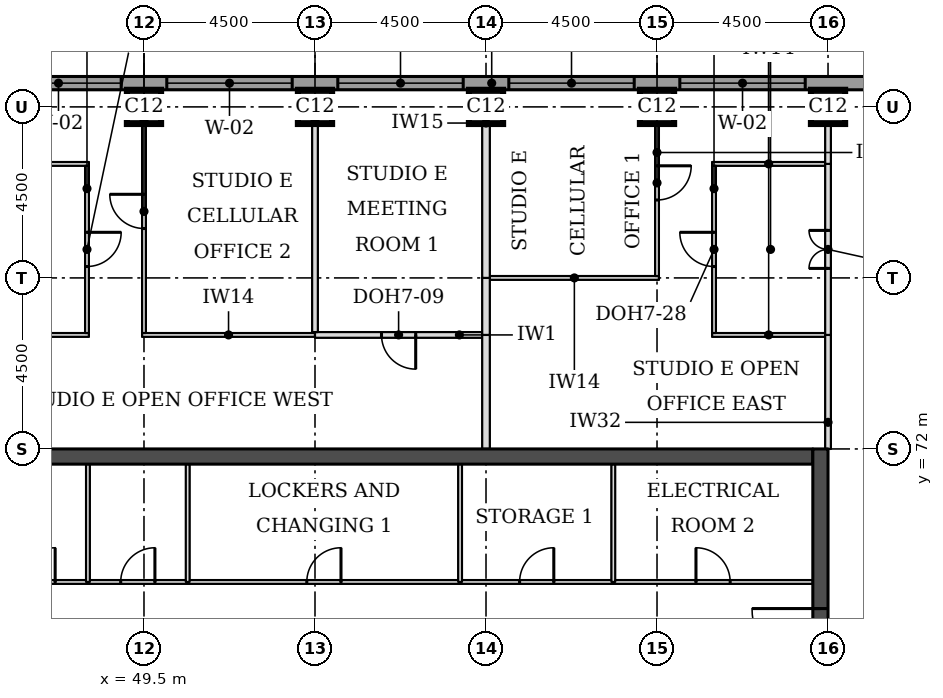
"""IFC4 building model, lengths in metres.
Left out: names, types, materials, properties, quantities, classifications, styles, units other than length and angle.
Written with IfcOpenShell. Run it as: python <this file> out.ifc"""

import sys

from ifc_helpers import new_model, si_unit, direction, frame, frame_2d, origin, origin_2d, place, context, subcontext, project, spatial, rectangle, extrude, element, fill, save


model = new_model("IFC4")
c1 = context("Model", 3, precision=1e-05, world=origin(), true_north=direction((0.0, 1.0)))
c2 = subcontext(c1, "Body", "Model", "MODEL_VIEW")
j1 = project(units=[si_unit("LENGTHUNIT", "METRE"), si_unit("PLANEANGLEUNIT", "RADIAN")], contexts=[c1])
p1 = place(None, origin())
s1 = spatial("IfcSite", under=j1, at=p1, CompositionType="ELEMENT")
p2 = place(p1, origin())
s2 = spatial("IfcBuilding", under=s1, at=p2, CompositionType="ELEMENT")
p3 = place(p2, frame((0.0, 0.0, 192.1)))
s3 = spatial("IfcBuildingStorey", under=s2, at=p3, CompositionType="ELEMENT", Elevation=192.1)
for number, where, z_axis, x_axis in (
    (1, (49.5, 81.0, 0.0), (0.0, 0.0, 1.0), (1.0, 0.0, 0.0)),
    (2, (54.0, 81.0, 0.0), (0.0, 0.0, 1.0), (1.0, 0.0, 0.0)),
    (3, (58.5, 81.0, 0.0), (0.0, 0.0, 1.0), (1.0, 0.0, 0.0)),
    (4, (63.0, 81.0, 0.0), (0.0, 0.0, 1.0), (1.0, 0.0, 0.0)),
    (5, (67.5, 81.0, 0.0), (0.0, 0.0, 1.0), (1.0, 0.0, 0.0)),
):
    element("IfcColumn", number, at=place(p3, frame(where, z_axis=z_axis, x_axis=x_axis)), inside=s3, PredefinedType="COLUMN", context=c2, shape_type="SweptSolid", body=[
        extrude(rectangle(XDim=0.9, YDim=0.9, at=origin_2d()), origin(), (0.0, 0.0, 1.0), 3.7),
    ])
p4 = place(p3, frame((45.4, 71.8, 0.0), z_axis=(0.0, 0.0, 1.0), x_axis=(1.0, 0.0, 0.0)))
e6 = element("IfcWall", 6, at=p4, inside=s3, PredefinedType="SHEAR", context=c2, shape_type="SweptSolid", body=[
    extrude(rectangle(XDim=21.7, YDim=0.4, at=frame_2d((10.85, 0.0))), origin(), (0.0, 0.0, 1.0), 3.7),
])
p5 = place(p3, frame((67.3, 49.5, 0.0), z_axis=(0.0, 0.0, 1.0), x_axis=(0.0, 1.0, 0.0)))
e7 = element("IfcWall", 7, at=p5, inside=s3, PredefinedType="SHEAR", context=c2, shape_type="SweptSolid", body=[
    extrude(rectangle(XDim=22.5, YDim=0.4, at=frame_2d((11.25, 0.0))), origin(), (0.0, 0.0, 1.0), 3.7),
])
p6 = place(p5, frame((4.2, 0.0, 0.0)))
e8 = element("IfcOpeningElement", 8, at=p6, cuts=e7, PredefinedType="OPENING", context=c2, shape_type="SweptSolid", body=[
    extrude(rectangle(XDim=1.8, YDim=2.1, at=frame_2d((0.9, 1.05))), frame((0.0, 0.21, 0.0), z_axis=(0.0, -1.0, 0.0), x_axis=(1.0, 0.0, 0.0)), (0.0, 0.0, 1.0), 0.42),
])
p7 = place(p5, frame((6.9, 0.0, 0.0)))
e9 = element("IfcOpeningElement", 9, at=p7, cuts=e7, PredefinedType="OPENING", context=c2, shape_type="SweptSolid", body=[
    extrude(rectangle(XDim=1.1, YDim=2.1, at=frame_2d((0.55, 1.05))), frame((0.0, 0.21, 0.0), z_axis=(0.0, -1.0, 0.0), x_axis=(1.0, 0.0, 0.0)), (0.0, 0.0, 1.0), 0.42),
])
p8 = place(p5, frame((13.6, 0.0, 0.0)))
e10 = element("IfcOpeningElement", 10, at=p8, cuts=e7, PredefinedType="OPENING", context=c2, shape_type="SweptSolid", body=[
    extrude(rectangle(XDim=1.1, YDim=2.1, at=frame_2d((0.55, 1.05))), frame((0.0, 0.21, 0.0), z_axis=(0.0, -1.0, 0.0), x_axis=(1.0, 0.0, 0.0)), (0.0, 0.0, 1.0), 0.42),
])
p9 = place(p5, frame((16.5, 0.0, 0.0)))
e11 = element("IfcOpeningElement", 11, at=p9, cuts=e7, PredefinedType="OPENING", context=c2, shape_type="SweptSolid", body=[
    extrude(rectangle(XDim=1.8, YDim=2.1, at=frame_2d((0.9, 1.05))), frame((0.0, 0.21, 0.0), z_axis=(0.0, -1.0, 0.0), x_axis=(1.0, 0.0, 0.0)), (0.0, 0.0, 1.0), 0.42),
])
p10 = place(p3, frame((72.331, 81.625, 0.0), z_axis=(0.0, 0.0, 1.0), x_axis=(-1.0, 0.0, 0.0)))
e12 = element("IfcWall", 12, at=p10, inside=s3, PredefinedType="STANDARD", context=c2, shape_type="SweptSolid", body=[
    extrude(rectangle(XDim=32.163, YDim=0.35, at=frame_2d((16.081, 0.0))), origin(), (0.0, 0.0, 1.0), 3.525),
])
p11 = place(p10, frame((5.431, 0.0, 0.9)))
e13 = element("IfcOpeningElement", 13, at=p11, cuts=e12, PredefinedType="OPENING", context=c2, shape_type="SweptSolid", body=[
    extrude(rectangle(XDim=3.3, YDim=1.9, at=frame_2d((1.65, 0.95))), frame((0.0, 0.185, 0.0), z_axis=(0.0, -1.0, 0.0), x_axis=(1.0, 0.0, 0.0)), (0.0, 0.0, 1.0), 0.37),
])
p12 = place(p10, frame((9.931, 0.0, 0.9)))
e14 = element("IfcOpeningElement", 14, at=p12, cuts=e12, PredefinedType="OPENING", context=c2, shape_type="SweptSolid", body=[
    extrude(rectangle(XDim=3.3, YDim=1.9, at=frame_2d((1.65, 0.95))), frame((0.0, 0.185, 0.0), z_axis=(0.0, -1.0, 0.0), x_axis=(1.0, 0.0, 0.0)), (0.0, 0.0, 1.0), 0.37),
])
p13 = place(p10, frame((14.431, 0.0, 0.9)))
e15 = element("IfcOpeningElement", 15, at=p13, cuts=e12, PredefinedType="OPENING", context=c2, shape_type="SweptSolid", body=[
    extrude(rectangle(XDim=3.3, YDim=1.9, at=frame_2d((1.65, 0.95))), frame((0.0, 0.185, 0.0), z_axis=(0.0, -1.0, 0.0), x_axis=(1.0, 0.0, 0.0)), (0.0, 0.0, 1.0), 0.37),
])
p14 = place(p10, frame((18.931, 0.0, 0.9)))
e16 = element("IfcOpeningElement", 16, at=p14, cuts=e12, PredefinedType="OPENING", context=c2, shape_type="SweptSolid", body=[
    extrude(rectangle(XDim=3.3, YDim=1.9, at=frame_2d((1.65, 0.95))), frame((0.0, 0.185, 0.0), z_axis=(0.0, -1.0, 0.0), x_axis=(1.0, 0.0, 0.0)), (0.0, 0.0, 1.0), 0.37),
])
p15 = place(p10, frame((23.431, 0.0, 0.9)))
e17 = element("IfcOpeningElement", 17, at=p15, cuts=e12, PredefinedType="OPENING", context=c2, shape_type="SweptSolid", body=[
    extrude(rectangle(XDim=3.3, YDim=1.9, at=frame_2d((1.65, 0.95))), frame((0.0, 0.185, 0.0), z_axis=(0.0, -1.0, 0.0), x_axis=(1.0, 0.0, 0.0)), (0.0, 0.0, 1.0), 0.37),
])
p16 = place(p3, frame((45.075, 75.0, 0.0), z_axis=(0.0, 0.0, 1.0), x_axis=(1.0, 0.0, 0.0)))
e18 = element("IfcWall", 18, at=p16, inside=s3, PredefinedType="PARTITIONING", context=c2, shape_type="SweptSolid", body=[
    extrude(rectangle(XDim=2.975, YDim=0.1, at=frame_2d((1.488, 0.0))), origin(), (0.0, 0.0, 1.0), 3.55),
])
p17 = place(p3, frame((49.45, 75.0, 0.0), z_axis=(0.0, 0.0, 1.0), x_axis=(1.0, 0.0, 0.0)))
e19 = element("IfcWall", 19, at=p17, inside=s3, PredefinedType="PARTITIONING", context=c2, shape_type="SweptSolid", body=[
    extrude(rectangle(XDim=4.55, YDim=0.1, at=frame_2d((2.275, 0.0))), origin(), (0.0, 0.0, 1.0), 3.55),
])
p18 = place(p3, frame((54.0, 75.0, 0.0), z_axis=(0.0, 0.0, 1.0), x_axis=(1.0, 0.0, 0.0)))
e20 = element("IfcWall", 20, at=p18, inside=s3, PredefinedType="PARTITIONING", context=c2, shape_type="SweptSolid", body=[
    extrude(rectangle(XDim=4.4, YDim=0.15, at=frame_2d((2.2, 0.0))), origin(), (0.0, 0.0, 1.0), 3.55),
])
p19 = place(p18, frame((1.75, 0.0, 0.0)))
e21 = element("IfcOpeningElement", 21, at=p19, cuts=e20, PredefinedType="OPENING", context=c2, shape_type="SweptSolid", body=[
    extrude(rectangle(XDim=0.9, YDim=2.1, at=frame_2d((0.45, 1.05))), frame((0.0, 0.085, 0.0), z_axis=(0.0, -1.0, 0.0), x_axis=(1.0, 0.0, 0.0)), (0.0, 0.0, 1.0), 0.17),
])
p20 = place(p3, frame((64.45, 75.0, 0.0), z_axis=(0.0, 0.0, 1.0), x_axis=(1.0, 0.0, 0.0)))
e22 = element("IfcWall", 22, at=p20, inside=s3, PredefinedType="PARTITIONING", context=c2, shape_type="SweptSolid", body=[
    extrude(rectangle(XDim=2.975, YDim=0.1, at=frame_2d((1.488, 0.0))), origin(), (0.0, 0.0, 1.0), 3.55),
])
p21 = place(p3, frame((58.6, 76.5, 0.0), z_axis=(0.0, 0.0, 1.0), x_axis=(1.0, 0.0, 0.0)))
e23 = element("IfcWall", 23, at=p21, inside=s3, PredefinedType="PARTITIONING", context=c2, shape_type="SweptSolid", body=[
    extrude(rectangle(XDim=4.45, YDim=0.1, at=frame_2d((2.225, 0.0))), origin(), (0.0, 0.0, 1.0), 3.55),
])
for number, where, z_axis, x_axis in (
    (24, (45.075, 79.5, 0.0), (0.0, 0.0, 1.0), (1.0, 0.0, 0.0)),
    (25, (64.45, 79.5, 0.0), (0.0, 0.0, 1.0), (1.0, 0.0, 0.0)),
):
    element("IfcWall", number, at=place(p3, frame(where, z_axis=z_axis, x_axis=x_axis)), inside=s3, PredefinedType="PARTITIONING", context=c2, shape_type="SweptSolid", body=[
        extrude(rectangle(XDim=2.975, YDim=0.1, at=frame_2d((1.488, 0.0))), origin(), (0.0, 0.0, 1.0), 3.55),
    ])
p22 = place(p3, frame((58.5, 72.0, 0.0), z_axis=(0.0, 0.0, 1.0), x_axis=(0.0, 1.0, 0.0)))
e26 = element("IfcWall", 26, at=p22, inside=s3, PredefinedType="PARTITIONING", context=c2, shape_type="SweptSolid", body=[
    extrude(rectangle(XDim=3.0, YDim=0.2, at=frame_2d((1.5, 0.0))), origin(), (0.0, 0.0, 1.0), 3.55),
])
p23 = place(p3, frame((67.5, 72.0, 0.0), z_axis=(0.0, 0.0, 1.0), x_axis=(0.0, 1.0, 0.0)))
e27 = element("IfcWall", 27, at=p23, inside=s3, PredefinedType="PARTITIONING", context=c2, shape_type="SweptSolid", body=[
    extrude(rectangle(XDim=3.0, YDim=0.15, at=frame_2d((1.5, 0.0))), origin(), (0.0, 0.0, 1.0), 3.022),
])
p24 = place(p3, frame((58.5, 75.0, 0.0), z_axis=(0.0, 0.0, 1.0), x_axis=(0.0, 1.0, 0.0)))
e28 = element("IfcWall", 28, at=p24, inside=s3, PredefinedType="PARTITIONING", context=c2, shape_type="SweptSolid", body=[
    extrude(rectangle(XDim=1.5, YDim=0.2, at=frame_2d((0.75, 0.0))), origin(), (0.0, 0.0, 1.0), 3.55),
])
p25 = place(p3, frame((67.5, 75.0, 0.0), z_axis=(0.0, 0.0, 1.0), x_axis=(0.0, 1.0, 0.0)))
e29 = element("IfcWall", 29, at=p25, inside=s3, PredefinedType="PARTITIONING", context=c2, shape_type="SweptSolid", body=[
    extrude(rectangle(XDim=4.5, YDim=0.15, at=frame_2d((2.25, 0.0))), origin(), (0.0, 0.0, 1.0), 3.022),
])
p26 = place(p25, frame((1.75, 0.0, 0.0)))
e30 = element("IfcOpeningElement", 30, at=p26, cuts=e29, PredefinedType="OPENING", context=c2, shape_type="SweptSolid", body=[
    extrude(rectangle(XDim=1.0, YDim=2.1, at=frame_2d((0.5, 1.05))), frame((0.0, 0.085, 0.0), z_axis=(0.0, -1.0, 0.0), x_axis=(1.0, 0.0, 0.0)), (0.0, 0.0, 1.0), 0.17),
])
p27 = place(p3, frame((48.0, 75.05, 0.0), z_axis=(0.0, 0.0, 1.0), x_axis=(0.0, 1.0, 0.0)))
e31 = element("IfcWall", 31, at=p27, inside=s3, PredefinedType="PARTITIONING", context=c2, shape_type="SweptSolid", body=[
    extrude(rectangle(XDim=4.4, YDim=0.1, at=frame_2d((2.2, 0.0))), origin(), (0.0, 0.0, 1.0), 3.55),
])
p28 = place(p27, frame((1.75, 0.0, 0.0)))
e32 = element("IfcOpeningElement", 32, at=p28, cuts=e31, PredefinedType="OPENING", context=c2, shape_type="SweptSolid", body=[
    extrude(rectangle(XDim=0.9, YDim=2.1, at=frame_2d((0.45, 1.05))), frame((0.0, 0.06, 0.0), z_axis=(0.0, -1.0, 0.0), x_axis=(1.0, 0.0, 0.0)), (0.0, 0.0, 1.0), 0.12),
])
p29 = place(p3, frame((49.5, 75.05, 0.0), z_axis=(0.0, 0.0, 1.0), x_axis=(0.0, 1.0, 0.0)))
e33 = element("IfcWall", 33, at=p29, inside=s3, PredefinedType="PARTITIONING", context=c2, shape_type="SweptSolid", body=[
    extrude(rectangle(XDim=6.4, YDim=0.1, at=frame_2d((3.2, 0.0))), origin(), (0.0, 0.0, 1.0), 3.55),
])
p30 = place(p29, frame((2.75, 0.0, 0.0)))
e34 = element("IfcOpeningElement", 34, at=p30, cuts=e33, PredefinedType="OPENING", context=c2, shape_type="SweptSolid", body=[
    extrude(rectangle(XDim=0.9, YDim=2.1, at=frame_2d((0.45, 1.05))), frame((0.0, 0.06, 0.0), z_axis=(0.0, -1.0, 0.0), x_axis=(1.0, 0.0, 0.0)), (0.0, 0.0, 1.0), 0.12),
])
p31 = place(p3, frame((64.5, 75.05, 0.0), z_axis=(0.0, 0.0, 1.0), x_axis=(0.0, 1.0, 0.0)))
e35 = element("IfcWall", 35, at=p31, inside=s3, PredefinedType="PARTITIONING", context=c2, shape_type="SweptSolid", body=[
    extrude(rectangle(XDim=4.4, YDim=0.1, at=frame_2d((2.2, 0.0))), origin(), (0.0, 0.0, 1.0), 3.55),
])
p32 = place(p31, frame((1.75, 0.0, 0.0)))
e36 = element("IfcOpeningElement", 36, at=p32, cuts=e35, PredefinedType="OPENING", context=c2, shape_type="SweptSolid", body=[
    extrude(rectangle(XDim=0.9, YDim=2.1, at=frame_2d((0.45, 1.05))), frame((0.0, 0.06, 0.0), z_axis=(0.0, -1.0, 0.0), x_axis=(1.0, 0.0, 0.0)), (0.0, 0.0, 1.0), 0.12),
])
p33 = place(p3, frame((54.0, 75.075, 0.0), z_axis=(0.0, 0.0, 1.0), x_axis=(0.0, 1.0, 0.0)))
e37 = element("IfcWall", 37, at=p33, inside=s3, PredefinedType="PARTITIONING", context=c2, shape_type="SweptSolid", body=[
    extrude(rectangle(XDim=6.375, YDim=0.15, at=frame_2d((3.188, 0.0))), origin(), (0.0, 0.0, 1.0), 3.55),
])
p34 = place(p3, frame((58.5, 76.5, 0.0), z_axis=(0.0, 0.0, 1.0), x_axis=(0.0, 1.0, 0.0)))
e38 = element("IfcWall", 38, at=p34, inside=s3, PredefinedType="PARTITIONING", context=c2, shape_type="SweptSolid", body=[
    extrude(rectangle(XDim=4.95, YDim=0.2, at=frame_2d((2.475, 0.0))), origin(), (0.0, 0.0, 1.0), 3.55),
])
p35 = place(p3, frame((63.0, 76.55, 0.0), z_axis=(0.0, 0.0, 1.0), x_axis=(0.0, 1.0, 0.0)))
e39 = element("IfcWall", 39, at=p35, inside=s3, PredefinedType="PARTITIONING", context=c2, shape_type="SweptSolid", body=[
    extrude(rectangle(XDim=4.9, YDim=0.1, at=frame_2d((2.45, 0.0))), origin(), (0.0, 0.0, 1.0), 3.55),
])
p36 = place(p35, frame((2.0, 0.0, 0.0)))
e40 = element("IfcOpeningElement", 40, at=p36, cuts=e39, PredefinedType="OPENING", context=c2, shape_type="SweptSolid", body=[
    extrude(rectangle(XDim=0.9, YDim=2.1, at=frame_2d((0.45, 1.05))), frame((0.0, 0.06, 0.0), z_axis=(0.0, -1.0, 0.0), x_axis=(1.0, 0.0, 0.0)), (0.0, 0.0, 1.0), 0.12),
])
p37 = place(p3, frame((67.5, 79.5, 0.0), z_axis=(0.0, 0.0, 1.0), x_axis=(0.0, 1.0, 0.0)))
e41 = element("IfcWall", 41, at=p37, inside=s3, PredefinedType="PARTITIONING", context=c2, shape_type="SweptSolid", body=[
    extrude(rectangle(XDim=1.95, YDim=0.15, at=frame_2d((0.975, 0.0))), origin(), (0.0, 0.0, 1.0), 3.022),
])
p38 = place(p3, frame((45.4, 68.5, 0.0), z_axis=(0.0, 0.0, 1.0), x_axis=(1.0, 0.0, 0.0)))
e42 = element("IfcWall", 42, at=p38, inside=s3, PredefinedType="PARTITIONING", context=c2, shape_type="SweptSolid", body=[
    extrude(rectangle(XDim=21.7, YDim=0.1, at=frame_2d((10.85, 0.0))), origin(), (0.0, 0.0, 1.0), 3.55),
])
p39 = place(p38, frame((18.625, 0.0, 0.0)))
e43 = element("IfcOpeningElement", 43, at=p39, cuts=e42, PredefinedType="OPENING", context=c2, shape_type="SweptSolid", body=[
    extrude(rectangle(XDim=0.9, YDim=2.1, at=frame_2d((0.45, 1.05))), frame((0.0, 0.06, 0.0), z_axis=(0.0, -1.0, 0.0), x_axis=(1.0, 0.0, 0.0)), (0.0, 0.0, 1.0), 0.12),
])
p40 = place(p38, frame((0.863, 0.0, 0.0)))
e44 = element("IfcOpeningElement", 44, at=p40, cuts=e42, PredefinedType="OPENING", context=c2, shape_type="SweptSolid", body=[
    extrude(rectangle(XDim=0.9, YDim=2.1, at=frame_2d((0.45, 1.05))), frame((0.0, 0.06, 0.0), z_axis=(0.0, -1.0, 0.0), x_axis=(1.0, 0.0, 0.0)), (0.0, 0.0, 1.0), 0.12),
])
p41 = place(p38, frame((3.488, 0.0, 0.0)))
e45 = element("IfcOpeningElement", 45, at=p41, cuts=e42, PredefinedType="OPENING", context=c2, shape_type="SweptSolid", body=[
    extrude(rectangle(XDim=0.9, YDim=2.1, at=frame_2d((0.45, 1.05))), frame((0.0, 0.06, 0.0), z_axis=(0.0, -1.0, 0.0), x_axis=(1.0, 0.0, 0.0)), (0.0, 0.0, 1.0), 0.12),
])
p42 = place(p38, frame((13.984, 0.0, 0.0)))
e46 = element("IfcOpeningElement", 46, at=p42, cuts=e42, PredefinedType="OPENING", context=c2, shape_type="SweptSolid", body=[
    extrude(rectangle(XDim=0.9, YDim=2.1, at=frame_2d((0.45, 1.05))), frame((0.0, 0.06, 0.0), z_axis=(0.0, -1.0, 0.0), x_axis=(1.0, 0.0, 0.0)), (0.0, 0.0, 1.0), 0.12),
])
p43 = place(p38, frame((8.384, 0.0, 0.0)))
e47 = element("IfcOpeningElement", 47, at=p43, cuts=e42, PredefinedType="OPENING", context=c2, shape_type="SweptSolid", body=[
    extrude(rectangle(XDim=0.9, YDim=2.1, at=frame_2d((0.45, 1.05))), frame((0.0, 0.06, 0.0), z_axis=(0.0, -1.0, 0.0), x_axis=(1.0, 0.0, 0.0)), (0.0, 0.0, 1.0), 0.12),
])
for number, where, z_axis, x_axis in (
    (48, (48.025, 68.5, 0.0), (0.0, 0.0, 1.0), (0.0, 1.0, 0.0)),
    (49, (50.65, 68.5, 0.0), (0.0, 0.0, 1.0), (0.0, 1.0, 0.0)),
    (50, (57.818, 68.5, 0.0), (0.0, 0.0, 1.0), (0.0, 1.0, 0.0)),
    (51, (61.85, 68.5, 0.0), (0.0, 0.0, 1.0), (0.0, 1.0, 0.0)),
):
    element("IfcWall", number, at=place(p3, frame(where, z_axis=z_axis, x_axis=x_axis)), inside=s3, PredefinedType="PARTITIONING", context=c2, shape_type="SweptSolid", body=[
        extrude(rectangle(XDim=3.1, YDim=0.1, at=frame_2d((1.55, 0.0))), origin(), (0.0, 0.0, 1.0), 3.55),
    ])
p44 = place(p11, origin())
e52 = element("IfcWindow", 52, at=p44, inside=s3, PartitioningType="SINGLE_PANEL", PredefinedType="WINDOW", context=c2, shape_type="SweptSolid", body=[
    extrude(rectangle(XDim=3.3, YDim=1.9, at=frame_2d((1.65, 0.95))), frame((0.0, 0.085, 0.0), z_axis=(0.0, -1.0, 0.0), x_axis=(1.0, 0.0, 0.0)), (0.0, 0.0, 1.0), 0.06),
])
fill(e13, e52)
p45 = place(p12, origin())
e53 = element("IfcWindow", 53, at=p45, inside=s3, PartitioningType="SINGLE_PANEL", PredefinedType="WINDOW", context=c2, shape_type="SweptSolid", body=[
    extrude(rectangle(XDim=3.3, YDim=1.9, at=frame_2d((1.65, 0.95))), frame((0.0, 0.085, 0.0), z_axis=(0.0, -1.0, 0.0), x_axis=(1.0, 0.0, 0.0)), (0.0, 0.0, 1.0), 0.06),
])
fill(e14, e53)
p46 = place(p13, origin())
e54 = element("IfcWindow", 54, at=p46, inside=s3, PartitioningType="SINGLE_PANEL", PredefinedType="WINDOW", context=c2, shape_type="SweptSolid", body=[
    extrude(rectangle(XDim=3.3, YDim=1.9, at=frame_2d((1.65, 0.95))), frame((0.0, 0.085, 0.0), z_axis=(0.0, -1.0, 0.0), x_axis=(1.0, 0.0, 0.0)), (0.0, 0.0, 1.0), 0.06),
])
fill(e15, e54)
p47 = place(p14, origin())
e55 = element("IfcWindow", 55, at=p47, inside=s3, PartitioningType="SINGLE_PANEL", PredefinedType="WINDOW", context=c2, shape_type="SweptSolid", body=[
    extrude(rectangle(XDim=3.3, YDim=1.9, at=frame_2d((1.65, 0.95))), frame((0.0, 0.085, 0.0), z_axis=(0.0, -1.0, 0.0), x_axis=(1.0, 0.0, 0.0)), (0.0, 0.0, 1.0), 0.06),
])
fill(e16, e55)
p48 = place(p15, origin())
e56 = element("IfcWindow", 56, at=p48, inside=s3, PartitioningType="SINGLE_PANEL", PredefinedType="WINDOW", context=c2, shape_type="SweptSolid", body=[
    extrude(rectangle(XDim=3.3, YDim=1.9, at=frame_2d((1.65, 0.95))), frame((0.0, 0.085, 0.0), z_axis=(0.0, -1.0, 0.0), x_axis=(1.0, 0.0, 0.0)), (0.0, 0.0, 1.0), 0.06),
])
fill(e17, e56)
p49 = place(p28, frame((0.9, 0.0, 0.0), z_axis=(0.0, 0.0, 1.0), x_axis=(-1.0, 0.0, 0.0)))
e57 = element("IfcDoor", 57, at=p49, inside=s3, OperationType="SINGLE_SWING_LEFT", PredefinedType="DOOR", context=c2, shape_type="SweptSolid", body=[
    extrude(rectangle(XDim=0.9, YDim=2.1, at=frame_2d((0.45, 1.05))), frame((0.0, 0.025, 0.0), z_axis=(0.0, -1.0, 0.0), x_axis=(1.0, 0.0, 0.0)), (0.0, 0.0, 1.0), 0.05),
])
fill(e32, e57)
p50 = place(p30, origin())
e58 = element("IfcDoor", 58, at=p50, inside=s3, OperationType="SINGLE_SWING_RIGHT", PredefinedType="DOOR", context=c2, shape_type="SweptSolid", body=[
    extrude(rectangle(XDim=0.9, YDim=2.1, at=frame_2d((0.45, 1.05))), frame((0.0, 0.025, 0.0), z_axis=(0.0, -1.0, 0.0), x_axis=(1.0, 0.0, 0.0)), (0.0, 0.0, 1.0), 0.05),
])
fill(e34, e58)
p51 = place(p19, frame((0.9, 0.0, 0.0), z_axis=(0.0, 0.0, 1.0), x_axis=(-1.0, 0.0, 0.0)))
e59 = element("IfcDoor", 59, at=p51, inside=s3, OperationType="SINGLE_SWING_LEFT", PredefinedType="DOOR", context=c2, shape_type="SweptSolid", body=[
    extrude(rectangle(XDim=0.9, YDim=2.1, at=frame_2d((0.45, 1.05))), frame((0.0, 0.025, 0.0), z_axis=(0.0, -1.0, 0.0), x_axis=(1.0, 0.0, 0.0)), (0.0, 0.0, 1.0), 0.05),
])
fill(e21, e59)
p52 = place(p26, origin())
e60 = element("IfcDoor", 60, at=p52, inside=s3, OperationType="DOUBLE_DOOR_SINGLE_SWING", PredefinedType="DOOR", context=c2, shape_type="SweptSolid", body=[
    extrude(rectangle(XDim=1.0, YDim=2.1, at=frame_2d((0.5, 1.05))), frame((0.0, 0.025, 0.0), z_axis=(0.0, -1.0, 0.0), x_axis=(1.0, 0.0, 0.0)), (0.0, 0.0, 1.0), 0.05),
])
fill(e30, e60)
p53 = place(p32, origin())
e61 = element("IfcDoor", 61, at=p53, inside=s3, OperationType="SINGLE_SWING_RIGHT", PredefinedType="DOOR", context=c2, shape_type="SweptSolid", body=[
    extrude(rectangle(XDim=0.9, YDim=2.1, at=frame_2d((0.45, 1.05))), frame((0.0, 0.025, 0.0), z_axis=(0.0, -1.0, 0.0), x_axis=(1.0, 0.0, 0.0)), (0.0, 0.0, 1.0), 0.05),
])
fill(e36, e61)
p54 = place(p36, frame((0.9, 0.0, 0.0), z_axis=(0.0, 0.0, 1.0), x_axis=(-1.0, 0.0, 0.0)))
e62 = element("IfcDoor", 62, at=p54, inside=s3, OperationType="SINGLE_SWING_LEFT", PredefinedType="DOOR", context=c2, shape_type="SweptSolid", body=[
    extrude(rectangle(XDim=0.9, YDim=2.1, at=frame_2d((0.45, 1.05))), frame((0.0, 0.025, 0.0), z_axis=(0.0, -1.0, 0.0), x_axis=(1.0, 0.0, 0.0)), (0.0, 0.0, 1.0), 0.05),
])
fill(e40, e62)
p55 = place(p9, origin())
e63 = element("IfcDoor", 63, at=p55, inside=s3, OperationType="SINGLE_SWING_RIGHT", PredefinedType="DOOR", context=c2, shape_type="SweptSolid", body=[
    extrude(rectangle(XDim=1.8, YDim=2.1, at=frame_2d((0.9, 1.05))), frame((0.0, 0.025, 0.0), z_axis=(0.0, -1.0, 0.0), x_axis=(1.0, 0.0, 0.0)), (0.0, 0.0, 1.0), 0.05),
])
fill(e11, e63)
p56 = place(p39, origin())
e64 = element("IfcDoor", 64, at=p56, inside=s3, OperationType="SINGLE_SWING_LEFT", PredefinedType="DOOR", context=c2, shape_type="SweptSolid", body=[
    extrude(rectangle(XDim=0.9, YDim=2.1, at=frame_2d((0.45, 1.05))), frame((0.0, 0.025, 0.0), z_axis=(0.0, -1.0, 0.0), x_axis=(1.0, 0.0, 0.0)), (0.0, 0.0, 1.0), 0.05),
])
fill(e43, e64)
p57 = place(p40, origin())
e65 = element("IfcDoor", 65, at=p57, inside=s3, OperationType="SINGLE_SWING_RIGHT", PredefinedType="DOOR", context=c2, shape_type="SweptSolid", body=[
    extrude(rectangle(XDim=0.9, YDim=2.1, at=frame_2d((0.45, 1.05))), frame((0.0, 0.025, 0.0), z_axis=(0.0, -1.0, 0.0), x_axis=(1.0, 0.0, 0.0)), (0.0, 0.0, 1.0), 0.05),
])
fill(e44, e65)
p58 = place(p41, origin())
e66 = element("IfcDoor", 66, at=p58, inside=s3, OperationType="SINGLE_SWING_RIGHT", PredefinedType="DOOR", context=c2, shape_type="SweptSolid", body=[
    extrude(rectangle(XDim=0.9, YDim=2.1, at=frame_2d((0.45, 1.05))), frame((0.0, 0.025, 0.0), z_axis=(0.0, -1.0, 0.0), x_axis=(1.0, 0.0, 0.0)), (0.0, 0.0, 1.0), 0.05),
])
fill(e45, e66)
p59 = place(p42, origin())
e67 = element("IfcDoor", 67, at=p59, inside=s3, OperationType="SINGLE_SWING_RIGHT", PredefinedType="DOOR", context=c2, shape_type="SweptSolid", body=[
    extrude(rectangle(XDim=0.9, YDim=2.1, at=frame_2d((0.45, 1.05))), frame((0.0, 0.025, 0.0), z_axis=(0.0, -1.0, 0.0), x_axis=(1.0, 0.0, 0.0)), (0.0, 0.0, 1.0), 0.05),
])
fill(e46, e67)
p60 = place(p43, origin())
e68 = element("IfcDoor", 68, at=p60, inside=s3, OperationType="SINGLE_SWING_RIGHT", PredefinedType="DOOR", context=c2, shape_type="SweptSolid", body=[
    extrude(rectangle(XDim=0.9, YDim=2.1, at=frame_2d((0.45, 1.05))), frame((0.0, 0.025, 0.0), z_axis=(0.0, -1.0, 0.0), x_axis=(1.0, 0.0, 0.0)), (0.0, 0.0, 1.0), 0.05),
])
fill(e47, e68)
save(model, sys.argv[1])
